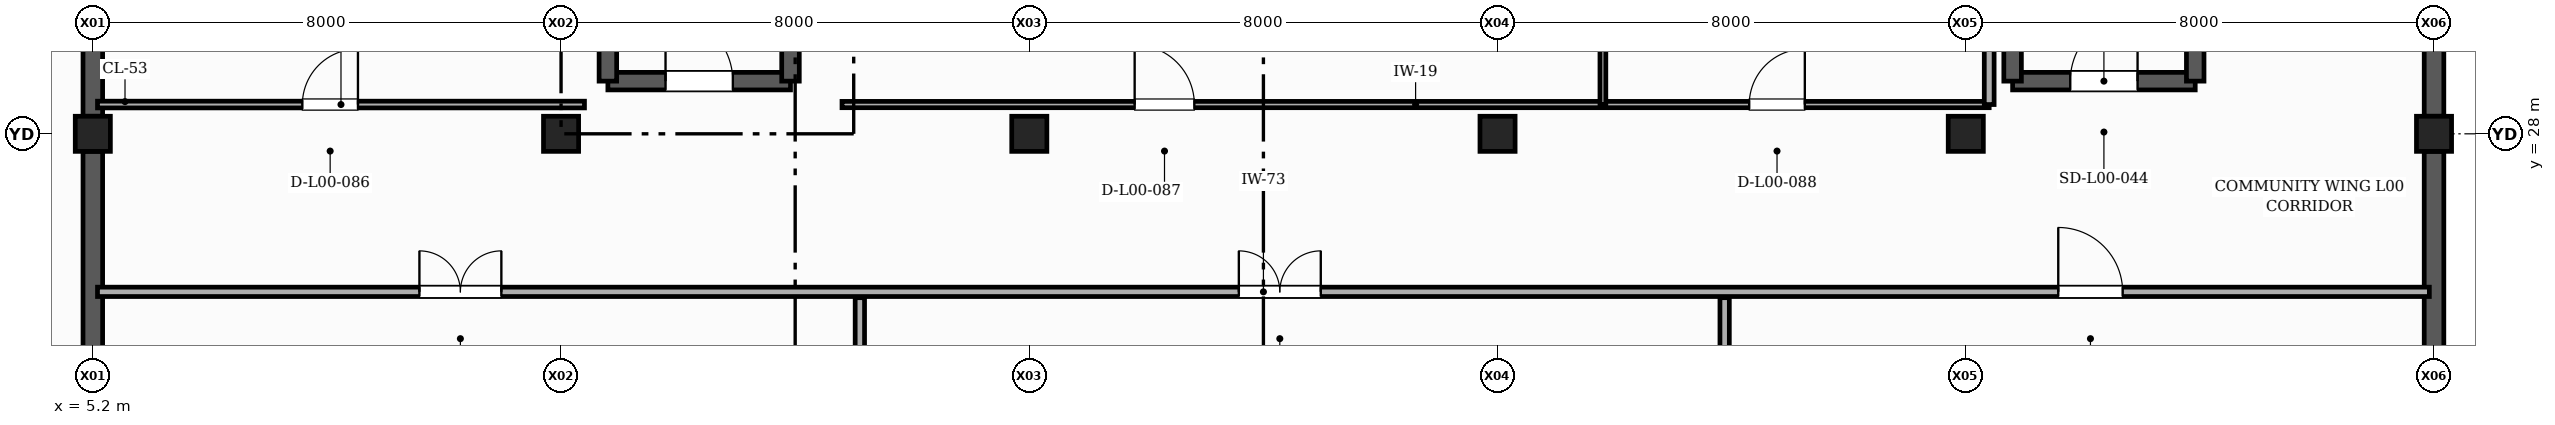
"""IFC4 building model, lengths in metres.
Left out: names, types, materials, properties, quantities, classifications, styles, units other than length and angle.
Written with IfcOpenShell. Run it as: python <this file> out.ifc"""

import sys

from ifc_helpers import new_model, si_unit, direction, frame, frame_2d, origin, origin_2d, place, context, subcontext, project, spatial, rectangle, extrude, element, fill, save


model = new_model("IFC4")
c1 = context("Model", 3, precision=1e-05, world=origin(), true_north=direction((0.0, 1.0)))
c2 = subcontext(c1, "Body", "Model", "MODEL_VIEW")
j1 = project(units=[si_unit("LENGTHUNIT", "METRE"), si_unit("PLANEANGLEUNIT", "RADIAN")], contexts=[c1])
p1 = place(None, origin())
s1 = spatial("IfcSite", under=j1, at=p1, CompositionType="ELEMENT")
p2 = place(p1, origin())
s2 = spatial("IfcBuilding", under=s1, at=p2, CompositionType="ELEMENT")
p3 = place(p2, origin())
s3 = spatial("IfcBuildingStorey", under=s2, at=p3, CompositionType="ELEMENT", Elevation=0.0)
for number, where, z_axis, x_axis in (
    (1, (5.2, 28.0, -0.5), (0.0, 0.0, 1.0), (1.0, 0.0, 0.0)),
    (2, (13.2, 28.0, -0.5), (0.0, 0.0, 1.0), (1.0, 0.0, 0.0)),
    (3, (21.2, 28.0, -0.5), (0.0, 0.0, 1.0), (1.0, 0.0, 0.0)),
    (4, (29.2, 28.0, -0.5), (0.0, 0.0, 1.0), (1.0, 0.0, 0.0)),
    (5, (37.2, 28.0, -0.5), (0.0, 0.0, 1.0), (1.0, 0.0, 0.0)),
    (6, (45.2, 28.0, -0.5), (0.0, 0.0, 1.0), (1.0, 0.0, 0.0)),
):
    element("IfcColumn", number, at=place(p3, frame(where, z_axis=z_axis, x_axis=x_axis)), inside=s3, PredefinedType="COLUMN", context=c2, shape_type="SweptSolid", body=[
        extrude(rectangle(XDim=0.6, YDim=0.6, at=origin_2d()), origin(), (0.0, 0.0, 1.0), 5.3),
    ])
for number, where, z_axis, x_axis in (
    (7, (45.2, 20.3, -0.42), (0.0, 0.0, 1.0), (0.0, 1.0, 0.0)),
    (8, (45.2, 28.3, -0.42), (0.0, 0.0, 1.0), (0.0, 1.0, 0.0)),
):
    element("IfcWall", number, at=place(p3, frame(where, z_axis=z_axis, x_axis=x_axis)), inside=s3, PredefinedType="SOLIDWALL", context=c2, shape_type="SweptSolid", body=[
        extrude(rectangle(XDim=7.4, YDim=0.335, at=frame_2d((3.7, 0.0))), origin(), (0.0, 0.0, 1.0), 4.3),
    ])
p4 = place(p3, frame((5.2, 35.7, -0.42), z_axis=(0.0, 0.0, 1.0), x_axis=(0.0, -1.0, 0.0)))
e9 = element("IfcWall", 9, at=p4, inside=s3, PredefinedType="SOLIDWALL", context=c2, shape_type="SweptSolid", body=[
    extrude(rectangle(XDim=7.4, YDim=0.335, at=frame_2d((3.7, 0.0))), origin(), (0.0, 0.0, 1.0), 4.3),
])
p5 = place(p4, frame((2.4, 0.0, 1.32)))
e10 = element("IfcOpeningElement", 10, at=p5, cuts=e9, PredefinedType="OPENING", context=c2, shape_type="SweptSolid", body=[
    extrude(rectangle(XDim=2.6, YDim=1.8, at=frame_2d((1.3, 0.9))), frame((0.0, 0.177, 0.0), z_axis=(0.0, -1.0, 0.0), x_axis=(1.0, 0.0, 0.0)), (0.0, 0.0, 1.0), 0.355),
])
p6 = place(p3, frame((5.2, 27.7, -0.42), z_axis=(0.0, 0.0, 1.0), x_axis=(0.0, -1.0, 0.0)))
e11 = element("IfcWall", 11, at=p6, inside=s3, PredefinedType="SOLIDWALL", context=c2, shape_type="SweptSolid", body=[
    extrude(rectangle(XDim=7.4, YDim=0.335, at=frame_2d((3.7, 0.0))), origin(), (0.0, 0.0, 1.0), 4.3),
])
p7 = place(p3, frame((14.0, 28.9, -0.52), z_axis=(0.0, 0.0, 1.0), x_axis=(1.0, 0.0, 0.0)))
e12 = element("IfcWall", 12, at=p7, inside=s3, PredefinedType="SHEAR", context=c2, shape_type="SweptSolid", body=[
    extrude(rectangle(XDim=3.12, YDim=0.3, at=frame_2d((1.56, 0.0))), origin(), (0.0, 0.0, 1.0), 5.32),
])
p8 = place(p7, frame((0.985, 0.0, 0.52)))
e13 = element("IfcOpeningElement", 13, at=p8, cuts=e12, PredefinedType="OPENING", context=c2, shape_type="SweptSolid", body=[
    extrude(rectangle(XDim=1.15, YDim=2.15, at=frame_2d((0.575, 1.075))), frame((0.0, 0.16, 0.0), z_axis=(0.0, -1.0, 0.0), x_axis=(1.0, 0.0, 0.0)), (0.0, 0.0, 1.0), 0.32),
])
for number, where, z_axis, x_axis in (
    (14, (17.12, 28.9, -0.52), (0.0, 0.0, 1.0), (0.0, 1.0, 0.0)),
    (15, (14.0, 36.0, -0.52), (0.0, 0.0, 1.0), (0.0, -1.0, 0.0)),
):
    element("IfcWall", number, at=place(p3, frame(where, z_axis=z_axis, x_axis=x_axis)), inside=s3, PredefinedType="SHEAR", context=c2, shape_type="SweptSolid", body=[
        extrude(rectangle(XDim=7.1, YDim=0.3, at=frame_2d((3.55, 0.0))), origin(), (0.0, 0.0, 1.0), 5.32),
    ])
p9 = place(p3, frame((38.0, 28.9, -0.52), z_axis=(0.0, 0.0, 1.0), x_axis=(1.0, 0.0, 0.0)))
e16 = element("IfcWall", 16, at=p9, inside=s3, PredefinedType="SHEAR", context=c2, shape_type="SweptSolid", body=[
    extrude(rectangle(XDim=3.12, YDim=0.3, at=frame_2d((1.56, 0.0))), origin(), (0.0, 0.0, 1.0), 5.32),
])
p10 = place(p9, frame((0.985, 0.0, 0.52)))
e17 = element("IfcOpeningElement", 17, at=p10, cuts=e16, PredefinedType="OPENING", context=c2, shape_type="SweptSolid", body=[
    extrude(rectangle(XDim=1.15, YDim=2.15, at=frame_2d((0.575, 1.075))), frame((0.0, 0.16, 0.0), z_axis=(0.0, -1.0, 0.0), x_axis=(1.0, 0.0, 0.0)), (0.0, 0.0, 1.0), 0.32),
])
for number, where, z_axis, x_axis in (
    (18, (41.12, 28.9, -0.52), (0.0, 0.0, 1.0), (0.0, 1.0, 0.0)),
    (19, (38.0, 36.0, -0.52), (0.0, 0.0, 1.0), (0.0, -1.0, 0.0)),
):
    element("IfcWall", number, at=place(p3, frame(where, z_axis=z_axis, x_axis=x_axis)), inside=s3, PredefinedType="SHEAR", context=c2, shape_type="SweptSolid", body=[
        extrude(rectangle(XDim=7.1, YDim=0.3, at=frame_2d((3.55, 0.0))), origin(), (0.0, 0.0, 1.0), 5.32),
    ])
for number, where, z_axis, x_axis in (
    (20, (18.305, 12.08, 0.0), (0.0, 0.0, 1.0), (0.0, 1.0, 0.0)),
    (21, (33.08, 12.08, 0.0), (0.0, 0.0, 1.0), (0.0, 1.0, 0.0)),
):
    element("IfcWall", number, at=place(p3, frame(where, z_axis=z_axis, x_axis=x_axis)), inside=s3, PredefinedType="PARTITIONING", context=c2, shape_type="SweptSolid", body=[
        extrude(rectangle(XDim=13.12, YDim=0.16, at=frame_2d((6.56, 0.0))), origin(), (0.0, 0.0, 1.0), 3.765),
    ])
p11 = place(p3, frame((5.28, 25.3, 0.0), z_axis=(0.0, 0.0, 1.0), x_axis=(1.0, 0.0, 0.0)))
e22 = element("IfcWall", 22, at=p11, inside=s3, PredefinedType="PARTITIONING", context=c2, shape_type="SweptSolid", body=[
    extrude(rectangle(XDim=39.84, YDim=0.16, at=frame_2d((19.92, 0.0))), origin(), (0.0, 0.0, 1.0), 3.865),
])
p12 = place(p11, frame((5.5, 0.0, 0.0)))
e23 = element("IfcOpeningElement", 23, at=p12, cuts=e22, PredefinedType="OPENING", context=c2, shape_type="SweptSolid", body=[
    extrude(rectangle(XDim=1.4, YDim=2.15, at=frame_2d((0.7, 1.075))), frame((0.0, 0.09, 0.0), z_axis=(0.0, -1.0, 0.0), x_axis=(1.0, 0.0, 0.0)), (0.0, 0.0, 1.0), 0.18),
])
p13 = place(p11, frame((19.5, 0.0, 0.0)))
e24 = element("IfcOpeningElement", 24, at=p13, cuts=e22, PredefinedType="OPENING", context=c2, shape_type="SweptSolid", body=[
    extrude(rectangle(XDim=1.4, YDim=2.15, at=frame_2d((0.7, 1.075))), frame((0.0, 0.09, 0.0), z_axis=(0.0, -1.0, 0.0), x_axis=(1.0, 0.0, 0.0)), (0.0, 0.0, 1.0), 0.18),
])
p14 = place(p11, frame((33.5, 0.0, 0.0)))
e25 = element("IfcOpeningElement", 25, at=p14, cuts=e22, PredefinedType="OPENING", context=c2, shape_type="SweptSolid", body=[
    extrude(rectangle(XDim=1.1, YDim=2.1, at=frame_2d((0.55, 1.05))), frame((0.0, 0.09, 0.0), z_axis=(0.0, -1.0, 0.0), x_axis=(1.0, 0.0, 0.0)), (0.0, 0.0, 1.0), 0.18),
])
p15 = place(p3, frame((5.28, 28.5, 0.0), z_axis=(0.0, 0.0, 1.0), x_axis=(1.0, 0.0, 0.0)))
e26 = element("IfcWall", 26, at=p15, inside=s3, PredefinedType="PARTITIONING", context=c2, shape_type="SweptSolid", body=[
    extrude(rectangle(XDim=8.32, YDim=0.115, at=frame_2d((4.16, 0.0))), origin(), (0.0, 0.0, 1.0), 3.765),
])
p16 = place(p15, frame((3.5, 0.0, 0.0)))
e27 = element("IfcOpeningElement", 27, at=p16, cuts=e26, PredefinedType="OPENING", context=c2, shape_type="SweptSolid", body=[
    extrude(rectangle(XDim=0.95, YDim=2.1, at=frame_2d((0.475, 1.05))), frame((0.0, 0.067, 0.0), z_axis=(0.0, -1.0, 0.0), x_axis=(1.0, 0.0, 0.0)), (0.0, 0.0, 1.0), 0.135),
])
p17 = place(p3, frame((18.0, 28.5, 0.0), z_axis=(0.0, 0.0, 1.0), x_axis=(1.0, 0.0, 0.0)))
e28 = element("IfcWall", 28, at=p17, inside=s3, PredefinedType="PARTITIONING", context=c2, shape_type="SweptSolid", body=[
    extrude(rectangle(XDim=19.6, YDim=0.108, at=frame_2d((9.8, 0.0))), origin(), (0.0, 0.0, 1.0), 3.765),
])
p18 = place(p17, frame((5.0, 0.0, 0.0)))
e29 = element("IfcOpeningElement", 29, at=p18, cuts=e28, PredefinedType="OPENING", context=c2, shape_type="SweptSolid", body=[
    extrude(rectangle(XDim=1.02, YDim=2.12, at=frame_2d((0.51, 1.06))), frame((0.0, 0.064, 0.0), z_axis=(0.0, -1.0, 0.0), x_axis=(1.0, 0.0, 0.0)), (0.0, 0.0, 1.0), 0.128),
])
p19 = place(p17, frame((15.5, 0.0, 0.0)))
e30 = element("IfcOpeningElement", 30, at=p19, cuts=e28, PredefinedType="OPENING", context=c2, shape_type="SweptSolid", body=[
    extrude(rectangle(XDim=0.95, YDim=2.15, at=frame_2d((0.475, 1.075))), frame((0.0, 0.064, 0.0), z_axis=(0.0, -1.0, 0.0), x_axis=(1.0, 0.0, 0.0)), (0.0, 0.0, 1.0), 0.128),
])
p20 = place(p3, frame((31.0, 28.5, 0.0), z_axis=(0.0, 0.0, 1.0), x_axis=(0.0, 1.0, 0.0)))
e31 = element("IfcWall", 31, at=p20, inside=s3, PredefinedType="PARTITIONING", context=c2, shape_type="SweptSolid", body=[
    extrude(rectangle(XDim=7.5, YDim=0.1, at=frame_2d((3.75, 0.0))), origin(), (0.0, 0.0, 1.0), 3.765),
])
p21 = place(p3, frame((37.6, 28.5, 0.0), z_axis=(0.0, 0.0, 1.0), x_axis=(0.0, 1.0, 0.0)))
e32 = element("IfcWall", 32, at=p21, inside=s3, PredefinedType="PARTITIONING", context=c2, shape_type="SweptSolid", body=[
    extrude(rectangle(XDim=7.5, YDim=0.168, at=frame_2d((3.75, 0.0))), origin(), (0.0, 0.0, 1.0), 4.53),
])
p22 = place(p8, origin())
e33 = element("IfcDoor", 33, at=p22, inside=s3, OperationType="SINGLE_SWING_LEFT", PredefinedType="DOOR", context=c2, shape_type="SweptSolid", body=[
    extrude(rectangle(XDim=1.15, YDim=2.15, at=frame_2d((0.575, 1.075))), frame((0.0, 0.025, 0.0), z_axis=(0.0, -1.0, 0.0), x_axis=(1.0, 0.0, 0.0)), (0.0, 0.0, 1.0), 0.05),
])
fill(e13, e33)
p23 = place(p10, origin())
e34 = element("IfcDoor", 34, at=p23, inside=s3, OperationType="SINGLE_SWING_RIGHT", PredefinedType="DOOR", context=c2, shape_type="SweptSolid", body=[
    extrude(rectangle(XDim=1.15, YDim=2.15, at=frame_2d((0.575, 1.075))), frame((0.0, 0.025, 0.0), z_axis=(0.0, -1.0, 0.0), x_axis=(1.0, 0.0, 0.0)), (0.0, 0.0, 1.0), 0.05),
])
fill(e17, e34)
p24 = place(p12, origin())
e35 = element("IfcDoor", 35, at=p24, inside=s3, OperationType="DOUBLE_DOOR_SINGLE_SWING", PredefinedType="DOOR", context=c2, shape_type="SweptSolid", body=[
    extrude(rectangle(XDim=1.4, YDim=2.15, at=frame_2d((0.7, 1.075))), frame((0.0, 0.025, 0.0), z_axis=(0.0, -1.0, 0.0), x_axis=(1.0, 0.0, 0.0)), (0.0, 0.0, 1.0), 0.05),
])
fill(e23, e35)
p25 = place(p13, origin())
e36 = element("IfcDoor", 36, at=p25, inside=s3, OperationType="DOUBLE_DOOR_SINGLE_SWING", PredefinedType="DOOR", context=c2, shape_type="SweptSolid", body=[
    extrude(rectangle(XDim=1.4, YDim=2.15, at=frame_2d((0.7, 1.075))), frame((0.0, 0.025, 0.0), z_axis=(0.0, -1.0, 0.0), x_axis=(1.0, 0.0, 0.0)), (0.0, 0.0, 1.0), 0.05),
])
fill(e24, e36)
p26 = place(p14, origin())
e37 = element("IfcDoor", 37, at=p26, inside=s3, OperationType="SINGLE_SWING_LEFT", PredefinedType="DOOR", context=c2, shape_type="SweptSolid", body=[
    extrude(rectangle(XDim=1.1, YDim=2.1, at=frame_2d((0.55, 1.05))), frame((0.0, 0.025, 0.0), z_axis=(0.0, -1.0, 0.0), x_axis=(1.0, 0.0, 0.0)), (0.0, 0.0, 1.0), 0.05),
])
fill(e25, e37)
p27 = place(p16, origin())
e38 = element("IfcDoor", 38, at=p27, inside=s3, OperationType="SINGLE_SWING_RIGHT", PredefinedType="DOOR", context=c2, shape_type="SweptSolid", body=[
    extrude(rectangle(XDim=0.95, YDim=2.1, at=frame_2d((0.475, 1.05))), frame((0.0, 0.025, 0.0), z_axis=(0.0, -1.0, 0.0), x_axis=(1.0, 0.0, 0.0)), (0.0, 0.0, 1.0), 0.05),
])
fill(e27, e38)
p28 = place(p18, origin())
e39 = element("IfcDoor", 39, at=p28, inside=s3, OperationType="SINGLE_SWING_LEFT", PredefinedType="DOOR", context=c2, shape_type="SweptSolid", body=[
    extrude(rectangle(XDim=1.02, YDim=2.12, at=frame_2d((0.51, 1.06))), frame((0.0, 0.025, 0.0), z_axis=(0.0, -1.0, 0.0), x_axis=(1.0, 0.0, 0.0)), (0.0, 0.0, 1.0), 0.05),
])
fill(e29, e39)
p29 = place(p19, origin())
e40 = element("IfcDoor", 40, at=p29, inside=s3, OperationType="SINGLE_SWING_RIGHT", PredefinedType="DOOR", context=c2, shape_type="SweptSolid", body=[
    extrude(rectangle(XDim=0.95, YDim=2.15, at=frame_2d((0.475, 1.075))), frame((0.0, 0.025, 0.0), z_axis=(0.0, -1.0, 0.0), x_axis=(1.0, 0.0, 0.0)), (0.0, 0.0, 1.0), 0.05),
])
fill(e30, e40)
save(model, sys.argv[1])
